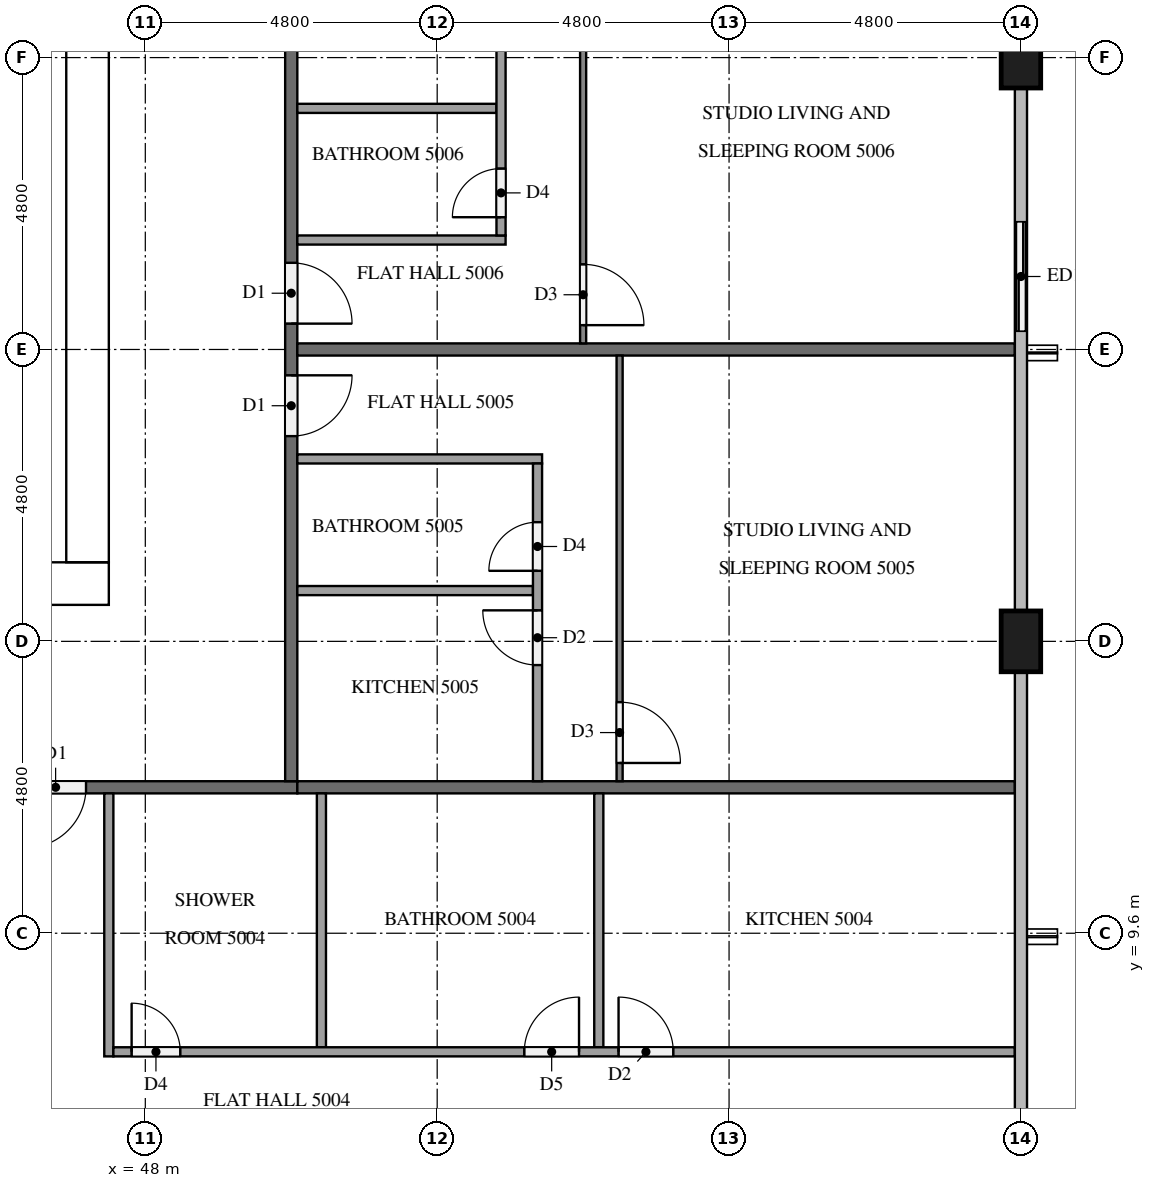
"""IFC4 building model, lengths in metres.
Left out: names, types, materials, properties, quantities, classifications, styles, units other than length and angle.
Written with IfcOpenShell. Run it as: python <this file> out.ifc"""

import sys

from ifc_helpers import new_model, si_unit, direction, frame, frame_2d, origin, origin_2d, place, context, subcontext, project, spatial, rectangle, extrude, element, fill, save


model = new_model("IFC4")
c1 = context("Model", 3, precision=1e-05, world=origin(), true_north=direction((0.0, 1.0)))
c2 = subcontext(c1, "Body", "Model", "MODEL_VIEW")
j1 = project(units=[si_unit("LENGTHUNIT", "METRE"), si_unit("PLANEANGLEUNIT", "RADIAN")], contexts=[c1])
p1 = place(None, origin())
s1 = spatial("IfcSite", under=j1, at=p1, CompositionType="ELEMENT")
p2 = place(p1, origin())
s2 = spatial("IfcBuilding", under=s1, at=p2, CompositionType="ELEMENT")
p3 = place(p2, frame((0.0, 0.0, 192.9)))
s3 = spatial("IfcBuildingStorey", under=s2, at=p3, CompositionType="ELEMENT", Elevation=192.9)
p4 = place(p3, frame((15.0, 15.35, 0.0), z_axis=(0.0, 0.0, 1.0), x_axis=(1.0, 0.0, 0.0)))
e1 = element("IfcWall", 1, at=p4, inside=s3, PredefinedType="SHEAR", context=c2, shape_type="SweptSolid", body=[
    extrude(rectangle(XDim=32.4, YDim=0.7, at=frame_2d((16.2, 0.0))), origin(), (0.0, 0.0, 1.0), 3.2),
])
p5 = place(p4, frame((15.3, 0.0, 0.0)))
e2 = element("IfcOpeningElement", 2, at=p5, cuts=e1, PredefinedType="OPENING", context=c2, shape_type="SweptSolid", body=[
    extrude(rectangle(XDim=1.8, YDim=2.1, at=frame_2d((0.9, 1.05))), frame((0.0, 0.36, 0.0), z_axis=(0.0, -1.0, 0.0), x_axis=(1.0, 0.0, 0.0)), (0.0, 0.0, 1.0), 0.72),
])
p6 = place(p3, frame((47.05, 15.7, 0.0), z_axis=(0.0, 0.0, 1.0), x_axis=(0.0, 1.0, 0.0)))
e3 = element("IfcWall", 3, at=p6, inside=s3, PredefinedType="SHEAR", context=c2, shape_type="SweptSolid", body=[
    extrude(rectangle(XDim=21.4, YDim=0.7, at=frame_2d((10.7, 0.0))), origin(), (0.0, 0.0, 1.0), 3.2),
])
p7 = place(p6, frame((10.4, 0.0, 0.0)))
e4 = element("IfcOpeningElement", 4, at=p7, cuts=e3, PredefinedType="OPENING", context=c2, shape_type="SweptSolid", body=[
    extrude(rectangle(XDim=1.2, YDim=2.1, at=frame_2d((0.6, 1.05))), frame((0.0, 0.36, 0.0), z_axis=(0.0, -1.0, 0.0), x_axis=(1.0, 0.0, 0.0)), (0.0, 0.0, 1.0), 0.72),
])
for number, where, z_axis, x_axis in (
    (5, (62.4, 14.4, 0.0), (0.0, 0.0, 1.0), (0.0, 1.0, 0.0)),
    (6, (62.4, 24.0, 0.0), (0.0, 0.0, 1.0), (0.0, 1.0, 0.0)),
):
    element("IfcColumn", number, at=place(p3, frame(where, z_axis=z_axis, x_axis=x_axis)), inside=s3, PredefinedType="COLUMN", context=c2, shape_type="SweptSolid", body=[
        extrude(rectangle(XDim=1.0, YDim=0.65, at=origin_2d()), origin(), (0.0, 0.0, 1.0), 3.2),
    ])
p8 = place(p3, frame((62.4, 19.2, 0.0), z_axis=(0.0, 0.0, 1.0), x_axis=(0.0, 1.0, 0.0)))
e7 = element("IfcWall", 7, at=p8, inside=s3, PredefinedType="SOLIDWALL", context=c2, shape_type="SweptSolid", body=[
    extrude(rectangle(XDim=2.4, YDim=0.15, at=frame_2d((1.2, 0.0))), origin(), (0.0, 0.0, 1.0), 3.2),
])
p9 = place(p8, frame((0.3, 0.0, 0.0)))
e8 = element("IfcOpeningElement", 8, at=p9, cuts=e7, PredefinedType="OPENING", context=c2, shape_type="SweptSolid", body=[
    extrude(rectangle(XDim=1.8, YDim=2.4, at=frame_2d((0.9, 1.2))), frame((0.0, 0.085, 0.0), z_axis=(0.0, -1.0, 0.0), x_axis=(1.0, 0.0, 0.0)), (0.0, 0.0, 1.0), 0.17),
])
p10 = place(p3, frame((50.5, 12.0, 0.0), z_axis=(0.0, 0.0, 1.0), x_axis=(-1.0, 0.0, 0.0)))
e9 = element("IfcWall", 9, at=p10, inside=s3, PredefinedType="PARTITIONING", context=c2, shape_type="SweptSolid", body=[
    extrude(rectangle(XDim=38.6, YDim=0.2, at=frame_2d((19.3, 0.0))), origin(), (0.0, 0.0, 1.0), 3.2),
])
p11 = place(p10, frame((31.725, 0.0, 0.0)))
e10 = element("IfcOpeningElement", 10, at=p11, cuts=e9, PredefinedType="OPENING", context=c2, shape_type="SweptSolid", body=[
    extrude(rectangle(XDim=1.0, YDim=2.1, at=frame_2d((0.5, 1.05))), frame((0.0, 0.11, 0.0), z_axis=(0.0, -1.0, 0.0), x_axis=(1.0, 0.0, 0.0)), (0.0, 0.0, 1.0), 0.22),
])
p12 = place(p10, frame((19.725, 0.0, 0.0)))
e11 = element("IfcOpeningElement", 11, at=p12, cuts=e9, PredefinedType="OPENING", context=c2, shape_type="SweptSolid", body=[
    extrude(rectangle(XDim=1.0, YDim=2.1, at=frame_2d((0.5, 1.05))), frame((0.0, 0.11, 0.0), z_axis=(0.0, -1.0, 0.0), x_axis=(1.0, 0.0, 0.0)), (0.0, 0.0, 1.0), 0.22),
])
p13 = place(p10, frame((17.875, 0.0, 0.0)))
e12 = element("IfcOpeningElement", 12, at=p13, cuts=e9, PredefinedType="OPENING", context=c2, shape_type="SweptSolid", body=[
    extrude(rectangle(XDim=1.0, YDim=2.1, at=frame_2d((0.5, 1.05))), frame((0.0, 0.11, 0.0), z_axis=(0.0, -1.0, 0.0), x_axis=(1.0, 0.0, 0.0)), (0.0, 0.0, 1.0), 0.22),
])
p14 = place(p10, frame((3.475, 0.0, 0.0)))
e13 = element("IfcOpeningElement", 13, at=p14, cuts=e9, PredefinedType="OPENING", context=c2, shape_type="SweptSolid", body=[
    extrude(rectangle(XDim=1.0, YDim=2.1, at=frame_2d((0.5, 1.05))), frame((0.0, 0.11, 0.0), z_axis=(0.0, -1.0, 0.0), x_axis=(1.0, 0.0, 0.0)), (0.0, 0.0, 1.0), 0.22),
])
p15 = place(p3, frame((50.4, 40.7, 0.0), z_axis=(0.0, 0.0, 1.0), x_axis=(0.0, -1.0, 0.0)))
e14 = element("IfcWall", 14, at=p15, inside=s3, PredefinedType="PARTITIONING", context=c2, shape_type="SweptSolid", body=[
    extrude(rectangle(XDim=28.6, YDim=0.2, at=frame_2d((14.3, 0.0))), origin(), (0.0, 0.0, 1.0), 3.2),
])
p16 = place(p15, frame((21.925, 0.0, 0.0)))
e15 = element("IfcOpeningElement", 15, at=p16, cuts=e14, PredefinedType="OPENING", context=c2, shape_type="SweptSolid", body=[
    extrude(rectangle(XDim=1.0, YDim=2.1, at=frame_2d((0.5, 1.05))), frame((0.0, 0.11, 0.0), z_axis=(0.0, -1.0, 0.0), x_axis=(1.0, 0.0, 0.0)), (0.0, 0.0, 1.0), 0.22),
])
p17 = place(p15, frame((20.075, 0.0, 0.0)))
e16 = element("IfcOpeningElement", 16, at=p17, cuts=e14, PredefinedType="OPENING", context=c2, shape_type="SweptSolid", body=[
    extrude(rectangle(XDim=1.0, YDim=2.1, at=frame_2d((0.5, 1.05))), frame((0.0, 0.11, 0.0), z_axis=(0.0, -1.0, 0.0), x_axis=(1.0, 0.0, 0.0)), (0.0, 0.0, 1.0), 0.22),
])
p18 = place(p15, frame((0.325, 0.0, 0.0)))
e17 = element("IfcOpeningElement", 17, at=p18, cuts=e14, PredefinedType="OPENING", context=c2, shape_type="SweptSolid", body=[
    extrude(rectangle(XDim=1.0, YDim=2.1, at=frame_2d((0.5, 1.05))), frame((0.0, 0.11, 0.0), z_axis=(0.0, -1.0, 0.0), x_axis=(1.0, 0.0, 0.0)), (0.0, 0.0, 1.0), 0.22),
])
for number, where, z_axis, x_axis in (
    (18, (50.5, 12.0, 0.0), (0.0, 0.0, 1.0), (1.0, 0.0, 0.0)),
    (19, (50.5, 19.2, 0.0), (0.0, 0.0, 1.0), (1.0, 0.0, 0.0)),
):
    element("IfcWall", number, at=place(p3, frame(where, z_axis=z_axis, x_axis=x_axis)), inside=s3, PredefinedType="PARTITIONING", context=c2, shape_type="SweptSolid", body=[
        extrude(rectangle(XDim=11.8, YDim=0.2, at=frame_2d((5.9, 0.0))), origin(), (0.0, 0.0, 1.0), 3.2),
    ])
for number, where, z_axis, x_axis in (
    (20, (50.896, 11.9, 0.0), (0.0, 0.0, 1.0), (0.0, -1.0, 0.0)),
    (21, (55.458, 11.9, 0.0), (0.0, 0.0, 1.0), (0.0, -1.0, 0.0)),
):
    element("IfcWall", number, at=place(p3, frame(where, z_axis=z_axis, x_axis=x_axis)), inside=s3, PredefinedType="PARTITIONING", context=c2, shape_type="SweptSolid", body=[
        extrude(rectangle(XDim=4.175, YDim=0.15, at=frame_2d((2.087, 0.0))), origin(), (0.0, 0.0, 1.0), 3.2),
    ])
p19 = place(p3, frame((47.4, 11.9, 0.0), z_axis=(0.0, 0.0, 1.0), x_axis=(0.0, -1.0, 0.0)))
e22 = element("IfcWall", 22, at=p19, inside=s3, PredefinedType="PARTITIONING", context=c2, shape_type="SweptSolid", body=[
    extrude(rectangle(XDim=4.325, YDim=0.15, at=frame_2d((2.163, 0.0))), origin(), (0.0, 0.0, 1.0), 3.2),
])
p20 = place(p3, frame((47.475, 7.65, 0.0), z_axis=(0.0, 0.0, 1.0), x_axis=(1.0, 0.0, 0.0)))
e23 = element("IfcWall", 23, at=p20, inside=s3, PredefinedType="PARTITIONING", context=c2, shape_type="SweptSolid", body=[
    extrude(rectangle(XDim=14.825, YDim=0.15, at=frame_2d((7.413, 0.0))), origin(), (0.0, 0.0, 1.0), 3.2),
])
p21 = place(p20, frame((0.3, 0.0, 0.0)))
e24 = element("IfcOpeningElement", 24, at=p21, cuts=e23, PredefinedType="OPENING", context=c2, shape_type="SweptSolid", body=[
    extrude(rectangle(XDim=0.8, YDim=2.1, at=frame_2d((0.4, 1.05))), frame((0.0, 0.085, 0.0), z_axis=(0.0, -1.0, 0.0), x_axis=(1.0, 0.0, 0.0)), (0.0, 0.0, 1.0), 0.17),
])
p22 = place(p20, frame((6.758, 0.0, 0.0)))
e25 = element("IfcOpeningElement", 25, at=p22, cuts=e23, PredefinedType="OPENING", context=c2, shape_type="SweptSolid", body=[
    extrude(rectangle(XDim=0.9, YDim=2.1, at=frame_2d((0.45, 1.05))), frame((0.0, 0.085, 0.0), z_axis=(0.0, -1.0, 0.0), x_axis=(1.0, 0.0, 0.0)), (0.0, 0.0, 1.0), 0.17),
])
p23 = place(p20, frame((8.308, 0.0, 0.0)))
e26 = element("IfcOpeningElement", 26, at=p23, cuts=e23, PredefinedType="OPENING", context=c2, shape_type="SweptSolid", body=[
    extrude(rectangle(XDim=0.9, YDim=2.1, at=frame_2d((0.45, 1.05))), frame((0.0, 0.085, 0.0), z_axis=(0.0, -1.0, 0.0), x_axis=(1.0, 0.0, 0.0)), (0.0, 0.0, 1.0), 0.17),
])
p24 = place(p3, frame((55.8, 19.1, 0.0), z_axis=(0.0, 0.0, 1.0), x_axis=(0.0, -1.0, 0.0)))
e27 = element("IfcWall", 27, at=p24, inside=s3, PredefinedType="PARTITIONING", context=c2, shape_type="SweptSolid", body=[
    extrude(rectangle(XDim=7.0, YDim=0.1, at=frame_2d((3.5, 0.0))), origin(), (0.0, 0.0, 1.0), 3.2),
])
p25 = place(p24, frame((5.7, 0.0, 0.0)))
e28 = element("IfcOpeningElement", 28, at=p25, cuts=e27, PredefinedType="OPENING", context=c2, shape_type="SweptSolid", body=[
    extrude(rectangle(XDim=1.0, YDim=2.1, at=frame_2d((0.5, 1.05))), frame((0.0, 0.06, 0.0), z_axis=(0.0, -1.0, 0.0), x_axis=(1.0, 0.0, 0.0)), (0.0, 0.0, 1.0), 0.12),
])
p26 = place(p3, frame((50.5, 15.235, 0.0), z_axis=(0.0, 0.0, 1.0), x_axis=(1.0, 0.0, 0.0)))
e29 = element("IfcWall", 29, at=p26, inside=s3, PredefinedType="PARTITIONING", context=c2, shape_type="SweptSolid", body=[
    extrude(rectangle(XDim=3.875, YDim=0.15, at=frame_2d((1.938, 0.0))), origin(), (0.0, 0.0, 1.0), 3.2),
])
p27 = place(p3, frame((50.5, 17.4, 0.0), z_axis=(0.0, 0.0, 1.0), x_axis=(1.0, 0.0, 0.0)))
e30 = element("IfcWall", 30, at=p27, inside=s3, PredefinedType="PARTITIONING", context=c2, shape_type="SweptSolid", body=[
    extrude(rectangle(XDim=4.025, YDim=0.15, at=frame_2d((2.012, 0.0))), origin(), (0.0, 0.0, 1.0), 3.2),
])
p28 = place(p3, frame((54.45, 12.1, 0.0), z_axis=(0.0, 0.0, 1.0), x_axis=(0.0, 1.0, 0.0)))
e31 = element("IfcWall", 31, at=p28, inside=s3, PredefinedType="PARTITIONING", context=c2, shape_type="SweptSolid", body=[
    extrude(rectangle(XDim=5.225, YDim=0.15, at=frame_2d((2.612, 0.0))), origin(), (0.0, 0.0, 1.0), 3.2),
])
p29 = place(p28, frame((3.46, 0.0, 0.0)))
e32 = element("IfcOpeningElement", 32, at=p29, cuts=e31, PredefinedType="OPENING", context=c2, shape_type="SweptSolid", body=[
    extrude(rectangle(XDim=0.8, YDim=2.1, at=frame_2d((0.4, 1.05))), frame((0.0, 0.085, 0.0), z_axis=(0.0, -1.0, 0.0), x_axis=(1.0, 0.0, 0.0)), (0.0, 0.0, 1.0), 0.17),
])
p30 = place(p28, frame((1.91, 0.0, 0.0)))
e33 = element("IfcOpeningElement", 33, at=p30, cuts=e31, PredefinedType="OPENING", context=c2, shape_type="SweptSolid", body=[
    extrude(rectangle(XDim=0.9, YDim=2.1, at=frame_2d((0.45, 1.05))), frame((0.0, 0.085, 0.0), z_axis=(0.0, -1.0, 0.0), x_axis=(1.0, 0.0, 0.0)), (0.0, 0.0, 1.0), 0.17),
])
p31 = place(p3, frame((55.2, 26.3, 0.0), z_axis=(0.0, 0.0, 1.0), x_axis=(0.0, -1.0, 0.0)))
e34 = element("IfcWall", 34, at=p31, inside=s3, PredefinedType="PARTITIONING", context=c2, shape_type="SweptSolid", body=[
    extrude(rectangle(XDim=7.0, YDim=0.1, at=frame_2d((3.5, 0.0))), origin(), (0.0, 0.0, 1.0), 3.2),
])
p32 = place(p31, frame((5.7, 0.0, 0.0)))
e35 = element("IfcOpeningElement", 35, at=p32, cuts=e34, PredefinedType="OPENING", context=c2, shape_type="SweptSolid", body=[
    extrude(rectangle(XDim=1.0, YDim=2.1, at=frame_2d((0.5, 1.05))), frame((0.0, 0.06, 0.0), z_axis=(0.0, -1.0, 0.0), x_axis=(1.0, 0.0, 0.0)), (0.0, 0.0, 1.0), 0.12),
])
p33 = place(p3, frame((50.5, 23.165, 0.0), z_axis=(0.0, 0.0, 1.0), x_axis=(1.0, 0.0, 0.0)))
e36 = element("IfcWall", 36, at=p33, inside=s3, PredefinedType="PARTITIONING", context=c2, shape_type="SweptSolid", body=[
    extrude(rectangle(XDim=3.275, YDim=0.15, at=frame_2d((1.637, 0.0))), origin(), (0.0, 0.0, 1.0), 3.2),
])
p34 = place(p3, frame((50.5, 21.0, 0.0), z_axis=(0.0, 0.0, 1.0), x_axis=(1.0, 0.0, 0.0)))
e37 = element("IfcWall", 37, at=p34, inside=s3, PredefinedType="PARTITIONING", context=c2, shape_type="SweptSolid", body=[
    extrude(rectangle(XDim=3.425, YDim=0.15, at=frame_2d((1.712, 0.0))), origin(), (0.0, 0.0, 1.0), 3.2),
])
p35 = place(p3, frame((53.85, 21.075, 0.0), z_axis=(0.0, 0.0, 1.0), x_axis=(0.0, 1.0, 0.0)))
e38 = element("IfcWall", 38, at=p35, inside=s3, PredefinedType="PARTITIONING", context=c2, shape_type="SweptSolid", body=[
    extrude(rectangle(XDim=5.225, YDim=0.15, at=frame_2d((2.613, 0.0))), origin(), (0.0, 0.0, 1.0), 3.2),
])
p36 = place(p35, frame((0.3, 0.0, 0.0)))
e39 = element("IfcOpeningElement", 39, at=p36, cuts=e38, PredefinedType="OPENING", context=c2, shape_type="SweptSolid", body=[
    extrude(rectangle(XDim=0.8, YDim=2.1, at=frame_2d((0.4, 1.05))), frame((0.0, 0.085, 0.0), z_axis=(0.0, -1.0, 0.0), x_axis=(1.0, 0.0, 0.0)), (0.0, 0.0, 1.0), 0.17),
])
p37 = place(p35, frame((3.975, 0.0, 0.0)))
e40 = element("IfcOpeningElement", 40, at=p37, cuts=e38, PredefinedType="OPENING", context=c2, shape_type="SweptSolid", body=[
    extrude(rectangle(XDim=0.9, YDim=2.1, at=frame_2d((0.45, 1.05))), frame((0.0, 0.085, 0.0), z_axis=(0.0, -1.0, 0.0), x_axis=(1.0, 0.0, 0.0)), (0.0, 0.0, 1.0), 0.17),
])
p38 = place(p9, origin())
e41 = element("IfcDoor", 41, at=p38, inside=s3, OperationType="SLIDING_TO_RIGHT", PredefinedType="DOOR", context=c2, shape_type="SweptSolid", body=[
    extrude(rectangle(XDim=1.8, YDim=2.4, at=frame_2d((0.9, 1.2))), frame((0.0, 0.025, 0.0), z_axis=(0.0, -1.0, 0.0), x_axis=(1.0, 0.0, 0.0)), (0.0, 0.0, 1.0), 0.05),
])
fill(e8, e41)
p39 = place(p14, origin())
e42 = element("IfcDoor", 42, at=p39, inside=s3, OperationType="SINGLE_SWING_RIGHT", PredefinedType="DOOR", context=c2, shape_type="SweptSolid", body=[
    extrude(rectangle(XDim=1.0, YDim=2.1, at=frame_2d((0.5, 1.05))), frame((0.0, 0.025, 0.0), z_axis=(0.0, -1.0, 0.0), x_axis=(1.0, 0.0, 0.0)), (0.0, 0.0, 1.0), 0.05),
])
fill(e13, e42)
p40 = place(p16, origin())
e43 = element("IfcDoor", 43, at=p40, inside=s3, OperationType="SINGLE_SWING_LEFT", PredefinedType="DOOR", context=c2, shape_type="SweptSolid", body=[
    extrude(rectangle(XDim=1.0, YDim=2.1, at=frame_2d((0.5, 1.05))), frame((0.0, 0.025, 0.0), z_axis=(0.0, -1.0, 0.0), x_axis=(1.0, 0.0, 0.0)), (0.0, 0.0, 1.0), 0.05),
])
fill(e15, e43)
p41 = place(p17, origin())
e44 = element("IfcDoor", 44, at=p41, inside=s3, OperationType="SINGLE_SWING_RIGHT", PredefinedType="DOOR", context=c2, shape_type="SweptSolid", body=[
    extrude(rectangle(XDim=1.0, YDim=2.1, at=frame_2d((0.5, 1.05))), frame((0.0, 0.025, 0.0), z_axis=(0.0, -1.0, 0.0), x_axis=(1.0, 0.0, 0.0)), (0.0, 0.0, 1.0), 0.05),
])
fill(e16, e44)
p42 = place(p21, origin())
e45 = element("IfcDoor", 45, at=p42, inside=s3, OperationType="SINGLE_SWING_LEFT", PredefinedType="DOOR", context=c2, shape_type="SweptSolid", body=[
    extrude(rectangle(XDim=0.8, YDim=2.1, at=frame_2d((0.4, 1.05))), frame((0.0, 0.025, 0.0), z_axis=(0.0, -1.0, 0.0), x_axis=(1.0, 0.0, 0.0)), (0.0, 0.0, 1.0), 0.05),
])
fill(e24, e45)
p43 = place(p22, origin())
e46 = element("IfcDoor", 46, at=p43, inside=s3, OperationType="SINGLE_SWING_RIGHT", PredefinedType="DOOR", context=c2, shape_type="SweptSolid", body=[
    extrude(rectangle(XDim=0.9, YDim=2.1, at=frame_2d((0.45, 1.05))), frame((0.0, 0.025, 0.0), z_axis=(0.0, -1.0, 0.0), x_axis=(1.0, 0.0, 0.0)), (0.0, 0.0, 1.0), 0.05),
])
fill(e25, e46)
p44 = place(p23, origin())
e47 = element("IfcDoor", 47, at=p44, inside=s3, OperationType="SINGLE_SWING_LEFT", PredefinedType="DOOR", context=c2, shape_type="SweptSolid", body=[
    extrude(rectangle(XDim=0.9, YDim=2.1, at=frame_2d((0.45, 1.05))), frame((0.0, 0.025, 0.0), z_axis=(0.0, -1.0, 0.0), x_axis=(1.0, 0.0, 0.0)), (0.0, 0.0, 1.0), 0.05),
])
fill(e26, e47)
p45 = place(p25, origin())
e48 = element("IfcDoor", 48, at=p45, inside=s3, OperationType="SINGLE_SWING_RIGHT", PredefinedType="DOOR", context=c2, shape_type="SweptSolid", body=[
    extrude(rectangle(XDim=1.0, YDim=2.1, at=frame_2d((0.5, 1.05))), frame((0.0, 0.025, 0.0), z_axis=(0.0, -1.0, 0.0), x_axis=(1.0, 0.0, 0.0)), (0.0, 0.0, 1.0), 0.05),
])
fill(e28, e48)
p46 = place(p29, origin())
e49 = element("IfcDoor", 49, at=p46, inside=s3, OperationType="SINGLE_SWING_LEFT", PredefinedType="DOOR", context=c2, shape_type="SweptSolid", body=[
    extrude(rectangle(XDim=0.8, YDim=2.1, at=frame_2d((0.4, 1.05))), frame((0.0, 0.025, 0.0), z_axis=(0.0, -1.0, 0.0), x_axis=(1.0, 0.0, 0.0)), (0.0, 0.0, 1.0), 0.05),
])
fill(e32, e49)
p47 = place(p30, origin())
e50 = element("IfcDoor", 50, at=p47, inside=s3, OperationType="SINGLE_SWING_RIGHT", PredefinedType="DOOR", context=c2, shape_type="SweptSolid", body=[
    extrude(rectangle(XDim=0.9, YDim=2.1, at=frame_2d((0.45, 1.05))), frame((0.0, 0.025, 0.0), z_axis=(0.0, -1.0, 0.0), x_axis=(1.0, 0.0, 0.0)), (0.0, 0.0, 1.0), 0.05),
])
fill(e33, e50)
p48 = place(p32, origin())
e51 = element("IfcDoor", 51, at=p48, inside=s3, OperationType="SINGLE_SWING_RIGHT", PredefinedType="DOOR", context=c2, shape_type="SweptSolid", body=[
    extrude(rectangle(XDim=1.0, YDim=2.1, at=frame_2d((0.5, 1.05))), frame((0.0, 0.025, 0.0), z_axis=(0.0, -1.0, 0.0), x_axis=(1.0, 0.0, 0.0)), (0.0, 0.0, 1.0), 0.05),
])
fill(e35, e51)
p49 = place(p36, origin())
e52 = element("IfcDoor", 52, at=p49, inside=s3, OperationType="SINGLE_SWING_LEFT", PredefinedType="DOOR", context=c2, shape_type="SweptSolid", body=[
    extrude(rectangle(XDim=0.8, YDim=2.1, at=frame_2d((0.4, 1.05))), frame((0.0, 0.025, 0.0), z_axis=(0.0, -1.0, 0.0), x_axis=(1.0, 0.0, 0.0)), (0.0, 0.0, 1.0), 0.05),
])
fill(e39, e52)
save(model, sys.argv[1])
